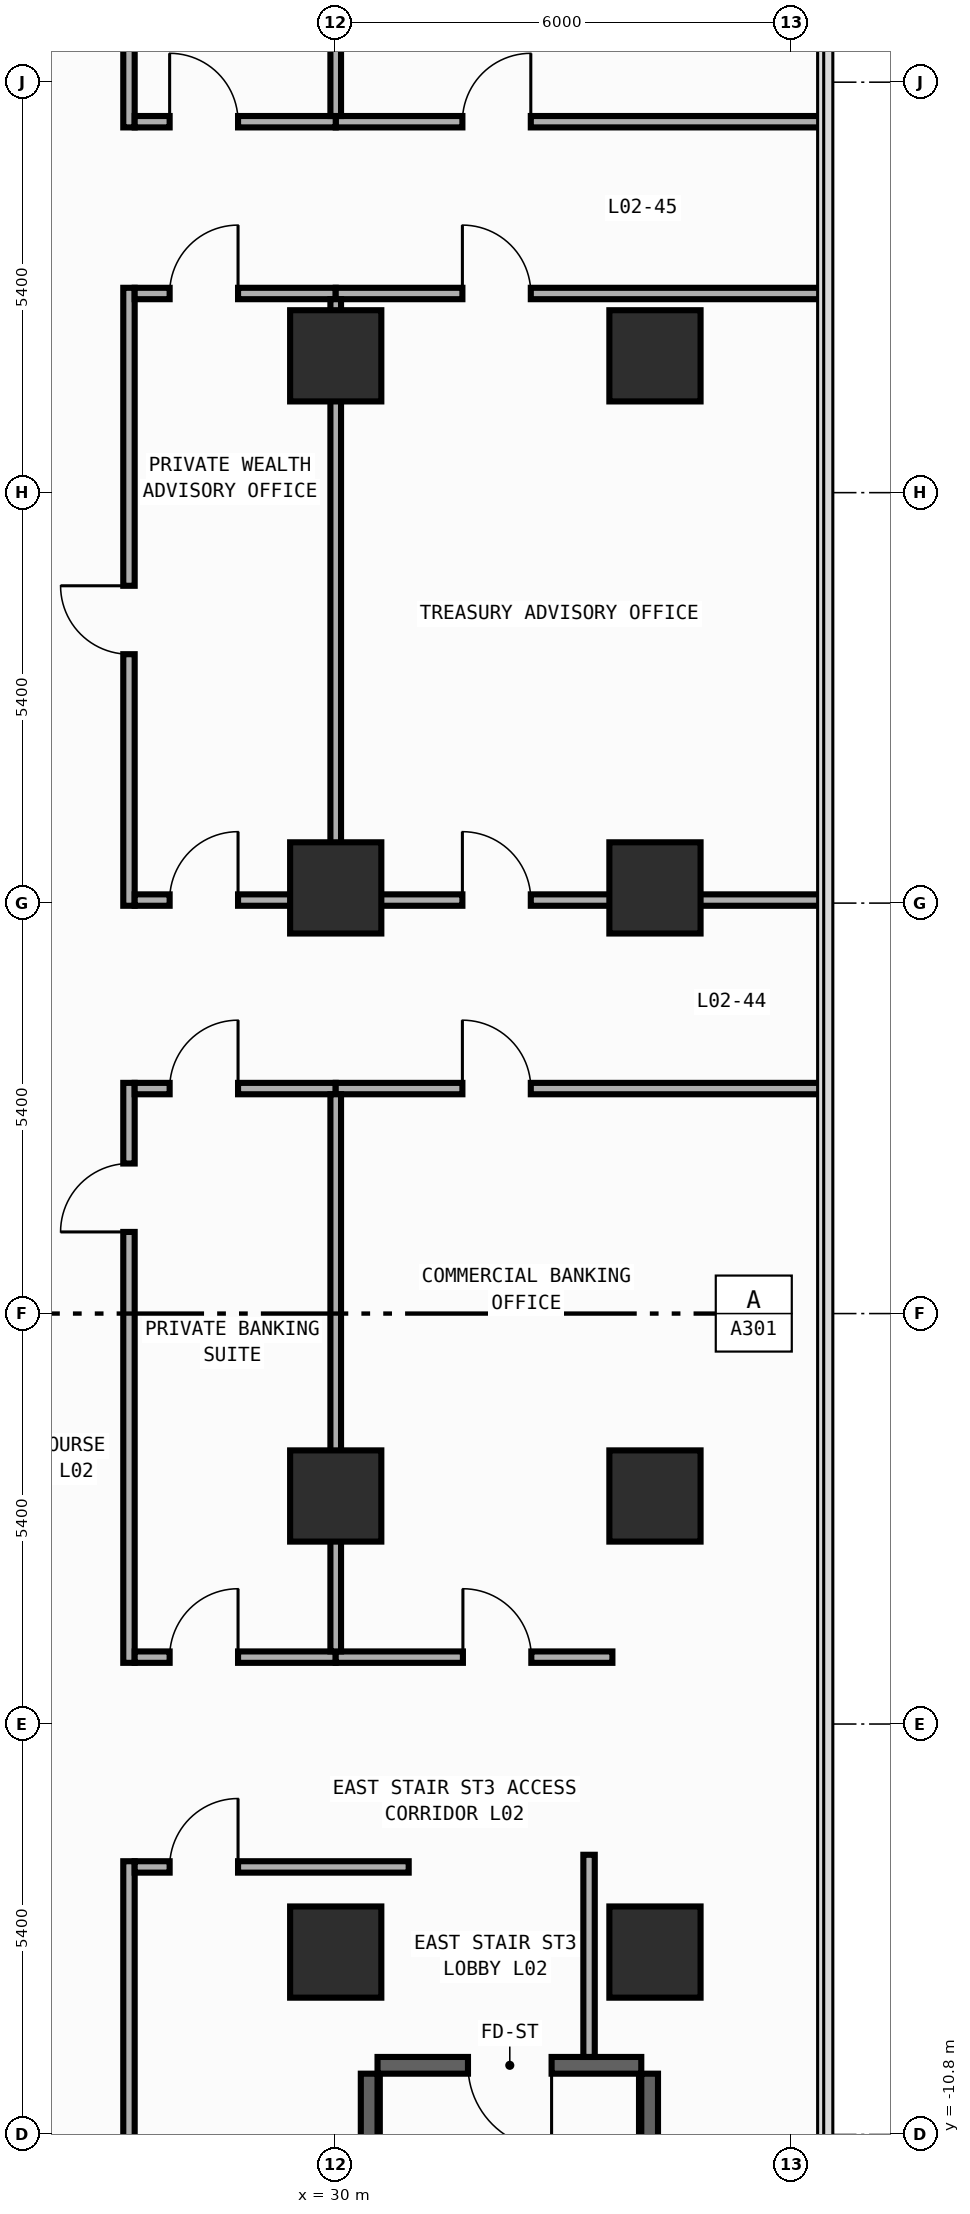
"""IFC4 building model, lengths in metres.
Left out: names, types, materials, properties, quantities, classifications, styles, units other than length and angle.
Written with IfcOpenShell. Run it as: python <this file> out.ifc"""

import sys

from ifc_helpers import new_model, si_unit, direction, frame, frame_2d, origin, origin_2d, place, context, subcontext, project, spatial, rectangle, extrude, element, fill, save


model = new_model("IFC4")
c1 = context("Model", 3, precision=1e-05, world=origin(), true_north=direction((0.0, 1.0)))
c2 = subcontext(c1, "Body", "Model", "MODEL_VIEW")
j1 = project(units=[si_unit("LENGTHUNIT", "METRE"), si_unit("PLANEANGLEUNIT", "RADIAN")], contexts=[c1])
p1 = place(None, origin())
s1 = spatial("IfcSite", under=j1, at=p1, CompositionType="ELEMENT")
p2 = place(p1, origin())
s2 = spatial("IfcBuilding", under=s1, at=p2, CompositionType="ELEMENT")
p3 = place(p2, frame((0.0, 0.0, 6.0)))
s3 = spatial("IfcBuildingStorey", under=s2, at=p3, CompositionType="ELEMENT", Elevation=6.0)
p4 = place(p3, frame((34.02, -9.89, 0.0), z_axis=(0.0, 0.0, 1.0), x_axis=(-1.0, 0.0, 0.0)))
e1 = element("IfcWall", 1, at=p4, inside=s3, PredefinedType="SHEAR", context=c2, shape_type="SweptSolid", body=[
    extrude(rectangle(XDim=3.47, YDim=0.22, at=frame_2d((1.735, 0.0))), origin(), (0.0, 0.0, 1.0), 4.7),
])
p5 = place(p4, frame((1.18, 0.0, 0.0)))
e2 = element("IfcOpeningElement", 2, at=p5, cuts=e1, PredefinedType="OPENING", context=c2, shape_type="SweptSolid", body=[
    extrude(rectangle(XDim=1.1, YDim=2.2, at=frame_2d((0.55, 1.1))), frame((0.0, 0.12, 0.0), z_axis=(0.0, -1.0, 0.0), x_axis=(1.0, 0.0, 0.0)), (0.0, 0.0, 1.0), 0.24),
])
for number, where, z_axis, x_axis in (
    (3, (30.44, -19.8, 0.0), (0.0, 0.0, 1.0), (0.0, 1.0, 0.0)),
    (4, (34.13, -19.8, 0.0), (0.0, 0.0, 1.0), (0.0, 1.0, 0.0)),
):
    element("IfcWall", number, at=place(p3, frame(where, z_axis=z_axis, x_axis=x_axis)), inside=s3, PredefinedType="SHEAR", context=c2, shape_type="SweptSolid", body=[
        extrude(rectangle(XDim=9.8, YDim=0.22, at=frame_2d((4.9, 0.0))), origin(), (0.0, 0.0, 1.0), 4.7),
    ])
for number, where, z_axis, x_axis in (
    (5, (30.0, -8.4, 0.0), (0.0, 0.0, 1.0), (1.0, 0.0, 0.0)),
    (6, (30.0, -2.4, 0.0), (0.0, 0.0, 1.0), (1.0, 0.0, 0.0)),
    (7, (30.0, 5.6, 0.0), (0.0, 0.0, 1.0), (1.0, 0.0, 0.0)),
    (8, (30.0, 12.6, 0.0), (0.0, 0.0, 1.0), (1.0, 0.0, 0.0)),
    (9, (34.2, -8.4, 0.0), (0.0, 0.0, 1.0), (1.0, 0.0, 0.0)),
    (10, (34.2, -2.4, 0.0), (0.0, 0.0, 1.0), (1.0, 0.0, 0.0)),
    (11, (34.2, 5.6, 0.0), (0.0, 0.0, 1.0), (1.0, 0.0, 0.0)),
    (12, (34.2, 12.6, 0.0), (0.0, 0.0, 1.0), (1.0, 0.0, 0.0)),
):
    element("IfcColumn", number, at=place(p3, frame(where, z_axis=z_axis, x_axis=x_axis)), inside=s3, PredefinedType="COLUMN", context=c2, shape_type="SweptSolid", body=[
        extrude(rectangle(XDim=1.2, YDim=1.2, at=origin_2d()), origin(), (0.0, 0.0, 1.0), 5.0),
    ])
p6 = place(p3, frame((27.28, -4.595, 0.0), z_axis=(0.0, 0.0, 1.0), x_axis=(0.0, 1.0, 0.0)))
e13 = element("IfcWall", 13, at=p6, inside=s3, PredefinedType="PARTITIONING", context=c2, shape_type="SweptSolid", body=[
    extrude(rectangle(XDim=7.63, YDim=0.15, at=frame_2d((3.815, 0.0))), origin(), (0.0, 0.0, 1.0), 4.7),
])
p7 = place(p6, frame((5.669, 0.0, 0.0)))
e14 = element("IfcOpeningElement", 14, at=p7, cuts=e13, PredefinedType="OPENING", context=c2, shape_type="SweptSolid", body=[
    extrude(rectangle(XDim=0.9, YDim=2.15, at=frame_2d((0.45, 1.075))), frame((0.0, 0.085, 0.0), z_axis=(0.0, -1.0, 0.0), x_axis=(1.0, 0.0, 0.0)), (0.0, 0.0, 1.0), 0.17),
])
p8 = place(p3, frame((27.28, 5.365, 0.0), z_axis=(0.0, 0.0, 1.0), x_axis=(0.0, 1.0, 0.0)))
e15 = element("IfcWall", 15, at=p8, inside=s3, PredefinedType="PARTITIONING", context=c2, shape_type="SweptSolid", body=[
    extrude(rectangle(XDim=8.13, YDim=0.15, at=frame_2d((4.065, 0.0))), origin(), (0.0, 0.0, 1.0), 4.7),
])
p9 = place(p8, frame((3.31, 0.0, 0.0)))
e16 = element("IfcOpeningElement", 16, at=p9, cuts=e15, PredefinedType="OPENING", context=c2, shape_type="SweptSolid", body=[
    extrude(rectangle(XDim=0.9, YDim=2.15, at=frame_2d((0.45, 1.075))), frame((0.0, 0.085, 0.0), z_axis=(0.0, -1.0, 0.0), x_axis=(1.0, 0.0, 0.0)), (0.0, 0.0, 1.0), 0.17),
])
p10 = place(p3, frame((27.28, -20.42, 0.0), z_axis=(0.0, 0.0, 1.0), x_axis=(0.0, 1.0, 0.0)))
e17 = element("IfcWall", 17, at=p10, inside=s3, PredefinedType="PARTITIONING", context=c2, shape_type="SweptSolid", body=[
    extrude(rectangle(XDim=13.215, YDim=0.15, at=frame_2d((6.607, 0.0))), origin(), (0.0, 0.0, 1.0), 4.7),
])
p11 = place(p10, frame((3.919, 0.0, 0.0)))
e18 = element("IfcOpeningElement", 18, at=p11, cuts=e17, PredefinedType="OPENING", context=c2, shape_type="SweptSolid", body=[
    extrude(rectangle(XDim=0.9, YDim=2.15, at=frame_2d((0.45, 1.075))), frame((0.0, 0.085, 0.0), z_axis=(0.0, -1.0, 0.0), x_axis=(1.0, 0.0, 0.0)), (0.0, 0.0, 1.0), 0.17),
])
p12 = place(p3, frame((27.28, 15.605, 0.0), z_axis=(0.0, 0.0, 1.0), x_axis=(0.0, 1.0, 0.0)))
e19 = element("IfcWall", 19, at=p12, inside=s3, PredefinedType="PARTITIONING", context=c2, shape_type="SweptSolid", body=[
    extrude(rectangle(XDim=11.644, YDim=0.15, at=frame_2d((5.822, 0.0))), origin(), (0.0, 0.0, 1.0), 4.7),
])
p13 = place(p12, frame((1.262, 0.0, 0.0)))
e20 = element("IfcOpeningElement", 20, at=p13, cuts=e19, PredefinedType="OPENING", context=c2, shape_type="SweptSolid", body=[
    extrude(rectangle(XDim=0.9, YDim=2.15, at=frame_2d((0.45, 1.075))), frame((0.0, 0.085, 0.0), z_axis=(0.0, -1.0, 0.0), x_axis=(1.0, 0.0, 0.0)), (0.0, 0.0, 1.0), 0.17),
])
p14 = place(p3, frame((27.355, 2.96, 0.0), z_axis=(0.0, 0.0, 1.0), x_axis=(1.0, 0.0, 0.0)))
e21 = element("IfcWall", 21, at=p14, inside=s3, PredefinedType="PARTITIONING", context=c2, shape_type="SweptSolid", body=[
    extrude(rectangle(XDim=2.645, YDim=0.15, at=frame_2d((1.323, 0.0))), origin(), (0.0, 0.0, 1.0), 4.7),
])
p15 = place(p14, frame((0.46, 0.0, 0.0)))
e22 = element("IfcOpeningElement", 22, at=p15, cuts=e21, PredefinedType="OPENING", context=c2, shape_type="SweptSolid", body=[
    extrude(rectangle(XDim=0.9, YDim=2.15, at=frame_2d((0.45, 1.075))), frame((0.0, 0.085, 0.0), z_axis=(0.0, -1.0, 0.0), x_axis=(1.0, 0.0, 0.0)), (0.0, 0.0, 1.0), 0.17),
])
p16 = place(p3, frame((30.0, 2.96, 0.0), z_axis=(0.0, 0.0, 1.0), x_axis=(1.0, 0.0, 0.0)))
e23 = element("IfcWall", 23, at=p16, inside=s3, PredefinedType="PARTITIONING", context=c2, shape_type="SweptSolid", body=[
    extrude(rectangle(XDim=6.445, YDim=0.15, at=frame_2d((3.223, 0.0))), origin(), (0.0, 0.0, 1.0), 4.7),
])
p17 = place(p16, frame((1.667, 0.0, 0.0)))
e24 = element("IfcOpeningElement", 24, at=p17, cuts=e23, PredefinedType="OPENING", context=c2, shape_type="SweptSolid", body=[
    extrude(rectangle(XDim=0.9, YDim=2.15, at=frame_2d((0.45, 1.075))), frame((0.0, 0.085, 0.0), z_axis=(0.0, -1.0, 0.0), x_axis=(1.0, 0.0, 0.0)), (0.0, 0.0, 1.0), 0.17),
])
p18 = place(p3, frame((27.355, 5.44, 0.0), z_axis=(0.0, 0.0, 1.0), x_axis=(1.0, 0.0, 0.0)))
e25 = element("IfcWall", 25, at=p18, inside=s3, PredefinedType="PARTITIONING", context=c2, shape_type="SweptSolid", body=[
    extrude(rectangle(XDim=2.645, YDim=0.15, at=frame_2d((1.323, 0.0))), origin(), (0.0, 0.0, 1.0), 3.8),
])
p19 = place(p18, frame((0.46, 0.0, 0.0)))
e26 = element("IfcOpeningElement", 26, at=p19, cuts=e25, PredefinedType="OPENING", context=c2, shape_type="SweptSolid", body=[
    extrude(rectangle(XDim=0.9, YDim=2.15, at=frame_2d((0.45, 1.075))), frame((0.0, 0.085, 0.0), z_axis=(0.0, -1.0, 0.0), x_axis=(1.0, 0.0, 0.0)), (0.0, 0.0, 1.0), 0.17),
])
p20 = place(p3, frame((30.0, 5.44, 0.0), z_axis=(0.0, 0.0, 1.0), x_axis=(1.0, 0.0, 0.0)))
e27 = element("IfcWall", 27, at=p20, inside=s3, PredefinedType="PARTITIONING", context=c2, shape_type="SweptSolid", body=[
    extrude(rectangle(XDim=6.445, YDim=0.15, at=frame_2d((3.223, 0.0))), origin(), (0.0, 0.0, 1.0), 3.8),
])
p21 = place(p20, frame((1.667, 0.0, 0.0)))
e28 = element("IfcOpeningElement", 28, at=p21, cuts=e27, PredefinedType="OPENING", context=c2, shape_type="SweptSolid", body=[
    extrude(rectangle(XDim=0.9, YDim=2.15, at=frame_2d((0.45, 1.075))), frame((0.0, 0.085, 0.0), z_axis=(0.0, -1.0, 0.0), x_axis=(1.0, 0.0, 0.0)), (0.0, 0.0, 1.0), 0.17),
])
p22 = place(p3, frame((27.355, 13.42, 0.0), z_axis=(0.0, 0.0, 1.0), x_axis=(1.0, 0.0, 0.0)))
e29 = element("IfcWall", 29, at=p22, inside=s3, PredefinedType="PARTITIONING", context=c2, shape_type="SweptSolid", body=[
    extrude(rectangle(XDim=2.645, YDim=0.15, at=frame_2d((1.323, 0.0))), origin(), (0.0, 0.0, 1.0), 4.7),
])
p23 = place(p22, frame((0.46, 0.0, 0.0)))
e30 = element("IfcOpeningElement", 30, at=p23, cuts=e29, PredefinedType="OPENING", context=c2, shape_type="SweptSolid", body=[
    extrude(rectangle(XDim=0.9, YDim=2.15, at=frame_2d((0.45, 1.075))), frame((0.0, 0.085, 0.0), z_axis=(0.0, -1.0, 0.0), x_axis=(1.0, 0.0, 0.0)), (0.0, 0.0, 1.0), 0.17),
])
p24 = place(p3, frame((30.0, 13.42, 0.0), z_axis=(0.0, 0.0, 1.0), x_axis=(1.0, 0.0, 0.0)))
e31 = element("IfcWall", 31, at=p24, inside=s3, PredefinedType="PARTITIONING", context=c2, shape_type="SweptSolid", body=[
    extrude(rectangle(XDim=6.445, YDim=0.15, at=frame_2d((3.223, 0.0))), origin(), (0.0, 0.0, 1.0), 4.7),
])
p25 = place(p24, frame((1.667, 0.0, 0.0)))
e32 = element("IfcOpeningElement", 32, at=p25, cuts=e31, PredefinedType="OPENING", context=c2, shape_type="SweptSolid", body=[
    extrude(rectangle(XDim=0.9, YDim=2.15, at=frame_2d((0.45, 1.075))), frame((0.0, 0.085, 0.0), z_axis=(0.0, -1.0, 0.0), x_axis=(1.0, 0.0, 0.0)), (0.0, 0.0, 1.0), 0.17),
])
p26 = place(p3, frame((30.0, 15.68, 0.0), z_axis=(0.0, 0.0, 1.0), x_axis=(1.0, 0.0, 0.0)))
e33 = element("IfcWall", 33, at=p26, inside=s3, PredefinedType="PARTITIONING", context=c2, shape_type="SweptSolid", body=[
    extrude(rectangle(XDim=6.445, YDim=0.15, at=frame_2d((3.223, 0.0))), origin(), (0.0, 0.0, 1.0), 4.7),
])
p27 = place(p26, frame((1.667, 0.0, 0.0)))
e34 = element("IfcOpeningElement", 34, at=p27, cuts=e33, PredefinedType="OPENING", context=c2, shape_type="SweptSolid", body=[
    extrude(rectangle(XDim=0.9, YDim=2.15, at=frame_2d((0.45, 1.075))), frame((0.0, 0.085, 0.0), z_axis=(0.0, -1.0, 0.0), x_axis=(1.0, 0.0, 0.0)), (0.0, 0.0, 1.0), 0.17),
])
p28 = place(p3, frame((27.355, 15.68, 0.0), z_axis=(0.0, 0.0, 1.0), x_axis=(1.0, 0.0, 0.0)))
e35 = element("IfcWall", 35, at=p28, inside=s3, PredefinedType="PARTITIONING", context=c2, shape_type="SweptSolid", body=[
    extrude(rectangle(XDim=2.645, YDim=0.15, at=frame_2d((1.323, 0.0))), origin(), (0.0, 0.0, 1.0), 4.7),
])
p29 = place(p28, frame((0.46, 0.0, 0.0)))
e36 = element("IfcOpeningElement", 36, at=p29, cuts=e35, PredefinedType="OPENING", context=c2, shape_type="SweptSolid", body=[
    extrude(rectangle(XDim=0.9, YDim=2.15, at=frame_2d((0.45, 1.075))), frame((0.0, 0.085, 0.0), z_axis=(0.0, -1.0, 0.0), x_axis=(1.0, 0.0, 0.0)), (0.0, 0.0, 1.0), 0.17),
])
p30 = place(p3, frame((27.355, -4.52, 0.0), z_axis=(0.0, 0.0, 1.0), x_axis=(1.0, 0.0, 0.0)))
e37 = element("IfcWall", 37, at=p30, inside=s3, PredefinedType="PARTITIONING", context=c2, shape_type="SweptSolid", body=[
    extrude(rectangle(XDim=2.645, YDim=0.15, at=frame_2d((1.323, 0.0))), origin(), (0.0, 0.0, 1.0), 4.7),
])
p31 = place(p30, frame((0.46, 0.0, 0.0)))
e38 = element("IfcOpeningElement", 38, at=p31, cuts=e37, PredefinedType="OPENING", context=c2, shape_type="SweptSolid", body=[
    extrude(rectangle(XDim=0.9, YDim=2.15, at=frame_2d((0.45, 1.075))), frame((0.0, 0.085, 0.0), z_axis=(0.0, -1.0, 0.0), x_axis=(1.0, 0.0, 0.0)), (0.0, 0.0, 1.0), 0.17),
])
p32 = place(p3, frame((30.0, -4.52, 0.0), z_axis=(0.0, 0.0, 1.0), x_axis=(1.0, 0.0, 0.0)))
e39 = element("IfcWall", 39, at=p32, inside=s3, PredefinedType="PARTITIONING", context=c2, shape_type="SweptSolid", body=[
    extrude(rectangle(XDim=3.64, YDim=0.15, at=frame_2d((1.82, 0.0))), origin(), (0.0, 0.0, 1.0), 4.7),
])
p33 = place(p32, frame((1.673, 0.0, 0.0)))
e40 = element("IfcOpeningElement", 40, at=p33, cuts=e39, PredefinedType="OPENING", context=c2, shape_type="SweptSolid", body=[
    extrude(rectangle(XDim=0.9, YDim=2.15, at=frame_2d((0.45, 1.075))), frame((0.0, 0.085, 0.0), z_axis=(0.0, -1.0, 0.0), x_axis=(1.0, 0.0, 0.0)), (0.0, 0.0, 1.0), 0.17),
])
p34 = place(p3, frame((27.355, -7.28, 0.0), z_axis=(0.0, 0.0, 1.0), x_axis=(1.0, 0.0, 0.0)))
e41 = element("IfcWall", 41, at=p34, inside=s3, PredefinedType="PARTITIONING", context=c2, shape_type="SweptSolid", body=[
    extrude(rectangle(XDim=3.605, YDim=0.15, at=frame_2d((1.802, 0.0))), origin(), (0.0, 0.0, 1.0), 4.7),
])
p35 = place(p34, frame((0.46, 0.0, 0.0)))
e42 = element("IfcOpeningElement", 42, at=p35, cuts=e41, PredefinedType="OPENING", context=c2, shape_type="SweptSolid", body=[
    extrude(rectangle(XDim=0.9, YDim=2.15, at=frame_2d((0.45, 1.075))), frame((0.0, 0.085, 0.0), z_axis=(0.0, -1.0, 0.0), x_axis=(1.0, 0.0, 0.0)), (0.0, 0.0, 1.0), 0.17),
])
p36 = place(p3, frame((33.333, -9.78, 0.0), z_axis=(0.0, 0.0, 1.0), x_axis=(0.0, 1.0, 0.0)))
e43 = element("IfcWall", 43, at=p36, inside=s3, PredefinedType="PARTITIONING", context=c2, shape_type="SweptSolid", body=[
    extrude(rectangle(XDim=2.66, YDim=0.15, at=frame_2d((1.33, 0.0))), origin(), (0.0, 0.0, 1.0), 4.7),
])
p37 = place(p3, frame((30.0, -4.445, 0.0), z_axis=(0.0, 0.0, 1.0), x_axis=(0.0, 1.0, 0.0)))
e44 = element("IfcWall", 44, at=p37, inside=s3, PredefinedType="PARTITIONING", context=c2, shape_type="SweptSolid", body=[
    extrude(rectangle(XDim=7.33, YDim=0.14, at=frame_2d((3.665, 0.0))), origin(), (0.0, 0.0, 1.0), 3.8),
])
p38 = place(p3, frame((30.0, 5.515, 0.0), z_axis=(0.0, 0.0, 1.0), x_axis=(0.0, 1.0, 0.0)))
e45 = element("IfcWall", 45, at=p38, inside=s3, PredefinedType="PARTITIONING", context=c2, shape_type="SweptSolid", body=[
    extrude(rectangle(XDim=7.83, YDim=0.14, at=frame_2d((3.915, 0.0))), origin(), (0.0, 0.0, 1.0), 3.8),
])
p39 = place(p3, frame((30.0, 15.755, 0.0), z_axis=(0.0, 0.0, 1.0), x_axis=(0.0, 1.0, 0.0)))
e46 = element("IfcWall", 46, at=p39, inside=s3, PredefinedType="PARTITIONING", context=c2, shape_type="SweptSolid", body=[
    extrude(rectangle(XDim=11.486, YDim=0.14, at=frame_2d((5.743, 0.0))), origin(), (0.0, 0.0, 1.0), 3.8),
])
p40 = place(p5, origin())
e47 = element("IfcDoor", 47, at=p40, inside=s3, OperationType="SINGLE_SWING_LEFT", PredefinedType="DOOR", context=c2, shape_type="SweptSolid", body=[
    extrude(rectangle(XDim=1.1, YDim=2.2, at=frame_2d((0.55, 1.1))), frame((0.0, 0.025, 0.0), z_axis=(0.0, -1.0, 0.0), x_axis=(1.0, 0.0, 0.0)), (0.0, 0.0, 1.0), 0.05),
])
fill(e2, e47)
p41 = place(p7, origin())
e48 = element("IfcDoor", 48, at=p41, inside=s3, OperationType="SINGLE_SWING_LEFT", PredefinedType="DOOR", context=c2, shape_type="SweptSolid", body=[
    extrude(rectangle(XDim=0.9, YDim=2.15, at=frame_2d((0.45, 1.075))), frame((0.0, 0.025, 0.0), z_axis=(0.0, -1.0, 0.0), x_axis=(1.0, 0.0, 0.0)), (0.0, 0.0, 1.0), 0.05),
])
fill(e14, e48)
p42 = place(p9, origin())
e49 = element("IfcDoor", 49, at=p42, inside=s3, OperationType="SINGLE_SWING_RIGHT", PredefinedType="DOOR", context=c2, shape_type="SweptSolid", body=[
    extrude(rectangle(XDim=0.9, YDim=2.15, at=frame_2d((0.45, 1.075))), frame((0.0, 0.025, 0.0), z_axis=(0.0, -1.0, 0.0), x_axis=(1.0, 0.0, 0.0)), (0.0, 0.0, 1.0), 0.05),
])
fill(e16, e49)
p43 = place(p15, origin())
e50 = element("IfcDoor", 50, at=p43, inside=s3, OperationType="SINGLE_SWING_RIGHT", PredefinedType="DOOR", context=c2, shape_type="SweptSolid", body=[
    extrude(rectangle(XDim=0.9, YDim=2.15, at=frame_2d((0.45, 1.075))), frame((0.0, 0.025, 0.0), z_axis=(0.0, -1.0, 0.0), x_axis=(1.0, 0.0, 0.0)), (0.0, 0.0, 1.0), 0.05),
])
fill(e22, e50)
p44 = place(p17, origin())
e51 = element("IfcDoor", 51, at=p44, inside=s3, OperationType="SINGLE_SWING_LEFT", PredefinedType="DOOR", context=c2, shape_type="SweptSolid", body=[
    extrude(rectangle(XDim=0.9, YDim=2.15, at=frame_2d((0.45, 1.075))), frame((0.0, 0.025, 0.0), z_axis=(0.0, -1.0, 0.0), x_axis=(1.0, 0.0, 0.0)), (0.0, 0.0, 1.0), 0.05),
])
fill(e24, e51)
p45 = place(p19, origin())
e52 = element("IfcDoor", 52, at=p45, inside=s3, OperationType="SINGLE_SWING_RIGHT", PredefinedType="DOOR", context=c2, shape_type="SweptSolid", body=[
    extrude(rectangle(XDim=0.9, YDim=2.15, at=frame_2d((0.45, 1.075))), frame((0.0, 0.025, 0.0), z_axis=(0.0, -1.0, 0.0), x_axis=(1.0, 0.0, 0.0)), (0.0, 0.0, 1.0), 0.05),
])
fill(e26, e52)
p46 = place(p21, origin())
e53 = element("IfcDoor", 53, at=p46, inside=s3, OperationType="SINGLE_SWING_LEFT", PredefinedType="DOOR", context=c2, shape_type="SweptSolid", body=[
    extrude(rectangle(XDim=0.9, YDim=2.15, at=frame_2d((0.45, 1.075))), frame((0.0, 0.025, 0.0), z_axis=(0.0, -1.0, 0.0), x_axis=(1.0, 0.0, 0.0)), (0.0, 0.0, 1.0), 0.05),
])
fill(e28, e53)
p47 = place(p23, origin())
e54 = element("IfcDoor", 54, at=p47, inside=s3, OperationType="SINGLE_SWING_RIGHT", PredefinedType="DOOR", context=c2, shape_type="SweptSolid", body=[
    extrude(rectangle(XDim=0.9, YDim=2.15, at=frame_2d((0.45, 1.075))), frame((0.0, 0.025, 0.0), z_axis=(0.0, -1.0, 0.0), x_axis=(1.0, 0.0, 0.0)), (0.0, 0.0, 1.0), 0.05),
])
fill(e30, e54)
p48 = place(p25, origin())
e55 = element("IfcDoor", 55, at=p48, inside=s3, OperationType="SINGLE_SWING_LEFT", PredefinedType="DOOR", context=c2, shape_type="SweptSolid", body=[
    extrude(rectangle(XDim=0.9, YDim=2.15, at=frame_2d((0.45, 1.075))), frame((0.0, 0.025, 0.0), z_axis=(0.0, -1.0, 0.0), x_axis=(1.0, 0.0, 0.0)), (0.0, 0.0, 1.0), 0.05),
])
fill(e32, e55)
p49 = place(p27, origin())
e56 = element("IfcDoor", 56, at=p49, inside=s3, OperationType="SINGLE_SWING_RIGHT", PredefinedType="DOOR", context=c2, shape_type="SweptSolid", body=[
    extrude(rectangle(XDim=0.9, YDim=2.15, at=frame_2d((0.45, 1.075))), frame((0.0, 0.025, 0.0), z_axis=(0.0, -1.0, 0.0), x_axis=(1.0, 0.0, 0.0)), (0.0, 0.0, 1.0), 0.05),
])
fill(e34, e56)
p50 = place(p29, origin())
e57 = element("IfcDoor", 57, at=p50, inside=s3, OperationType="SINGLE_SWING_LEFT", PredefinedType="DOOR", context=c2, shape_type="SweptSolid", body=[
    extrude(rectangle(XDim=0.9, YDim=2.15, at=frame_2d((0.45, 1.075))), frame((0.0, 0.025, 0.0), z_axis=(0.0, -1.0, 0.0), x_axis=(1.0, 0.0, 0.0)), (0.0, 0.0, 1.0), 0.05),
])
fill(e36, e57)
p51 = place(p31, origin())
e58 = element("IfcDoor", 58, at=p51, inside=s3, OperationType="SINGLE_SWING_RIGHT", PredefinedType="DOOR", context=c2, shape_type="SweptSolid", body=[
    extrude(rectangle(XDim=0.9, YDim=2.15, at=frame_2d((0.45, 1.075))), frame((0.0, 0.025, 0.0), z_axis=(0.0, -1.0, 0.0), x_axis=(1.0, 0.0, 0.0)), (0.0, 0.0, 1.0), 0.05),
])
fill(e38, e58)
p52 = place(p33, origin())
e59 = element("IfcDoor", 59, at=p52, inside=s3, OperationType="SINGLE_SWING_LEFT", PredefinedType="DOOR", context=c2, shape_type="SweptSolid", body=[
    extrude(rectangle(XDim=0.9, YDim=2.15, at=frame_2d((0.45, 1.075))), frame((0.0, 0.025, 0.0), z_axis=(0.0, -1.0, 0.0), x_axis=(1.0, 0.0, 0.0)), (0.0, 0.0, 1.0), 0.05),
])
fill(e40, e59)
p53 = place(p35, origin())
e60 = element("IfcDoor", 60, at=p53, inside=s3, OperationType="SINGLE_SWING_RIGHT", PredefinedType="DOOR", context=c2, shape_type="SweptSolid", body=[
    extrude(rectangle(XDim=0.9, YDim=2.15, at=frame_2d((0.45, 1.075))), frame((0.0, 0.025, 0.0), z_axis=(0.0, -1.0, 0.0), x_axis=(1.0, 0.0, 0.0)), (0.0, 0.0, 1.0), 0.05),
])
fill(e42, e60)
save(model, sys.argv[1])
